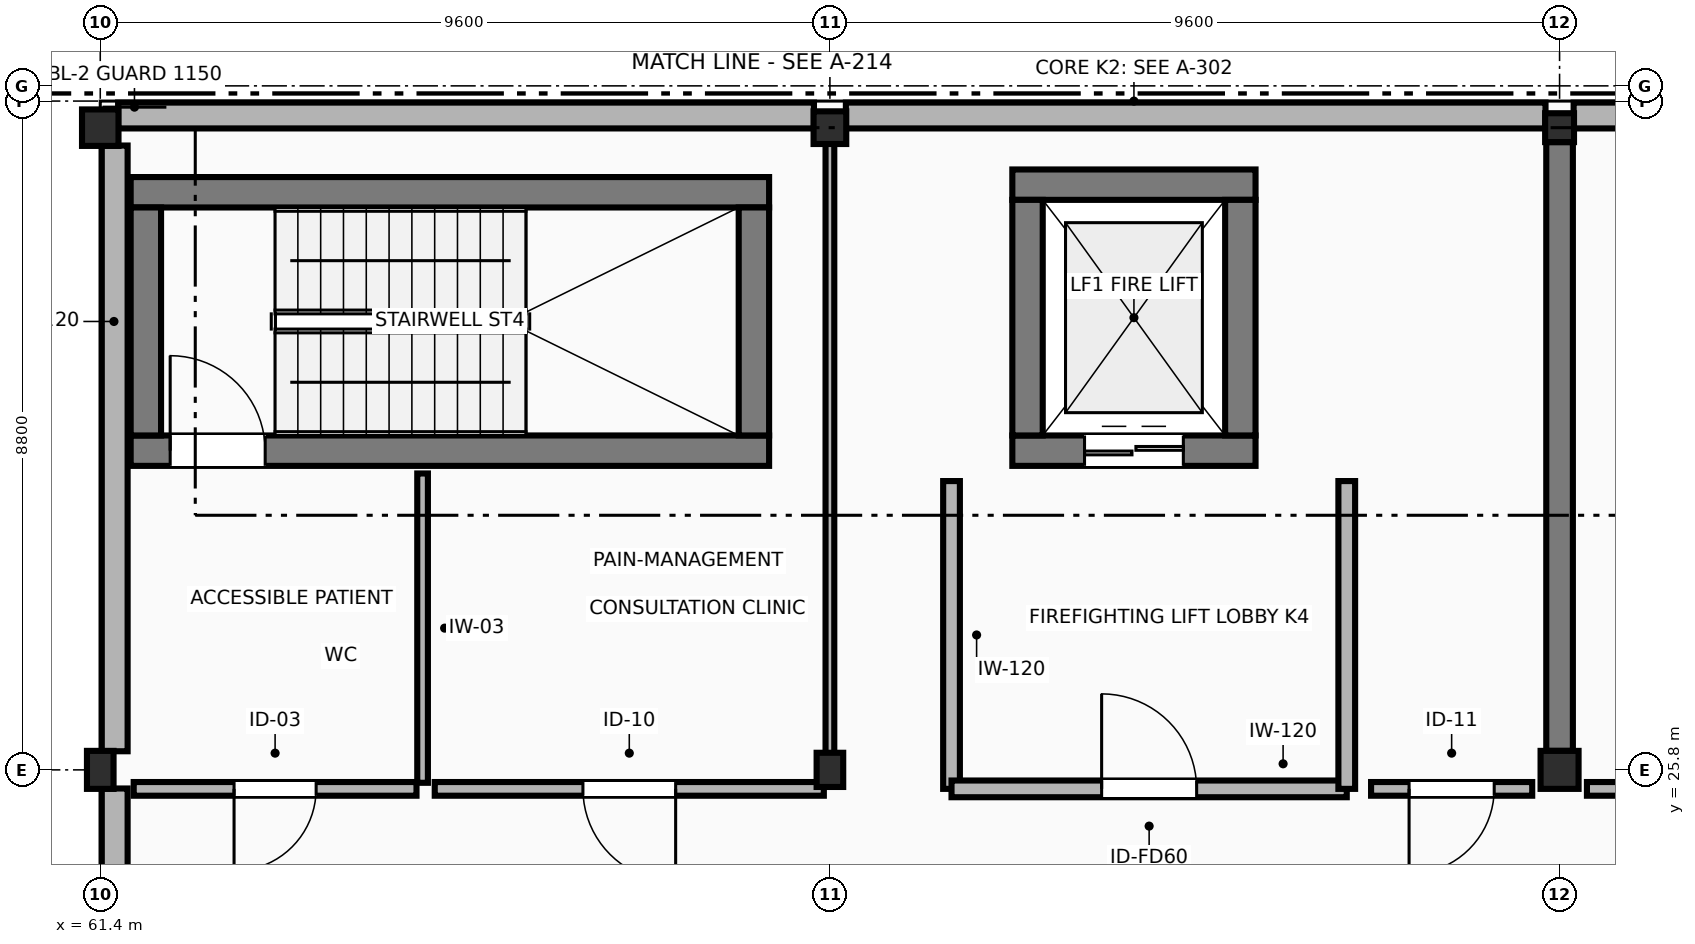
"""IFC4 building model, lengths in metres.
Left out: names, types, materials, properties, quantities, classifications, styles, units other than length and angle.
Written with IfcOpenShell. Run it as: python <this file> out.ifc"""

import sys

from ifc_helpers import new_model, si_unit, direction, frame, frame_2d, origin, origin_2d, place, context, subcontext, project, spatial, rectangle, extrude, element, fill, save


model = new_model("IFC4")
c1 = context("Model", 3, precision=1e-05, world=origin(), true_north=direction((0.0, 1.0)))
c2 = subcontext(c1, "Body", "Model", "MODEL_VIEW")
j1 = project(units=[si_unit("LENGTHUNIT", "METRE"), si_unit("PLANEANGLEUNIT", "RADIAN")], contexts=[c1])
p1 = place(None, origin())
s1 = spatial("IfcSite", under=j1, at=p1, CompositionType="ELEMENT")
p2 = place(p1, origin())
s2 = spatial("IfcBuilding", under=s1, at=p2, CompositionType="ELEMENT")
p3 = place(p2, frame((0.0, 0.0, 18.0)))
s3 = spatial("IfcBuildingStorey", under=s2, at=p3, CompositionType="ELEMENT", Elevation=18.0)
p4 = place(p3, frame((61.4, 25.8, 0.0), z_axis=(0.0, 0.0, 1.0), x_axis=(1.0, 0.0, 0.0)))
e1 = element("IfcColumn", 1, at=p4, inside=s3, PredefinedType="COLUMN", context=c2, shape_type="SweptSolid", body=[
    extrude(rectangle(XDim=0.35, YDim=0.5, at=origin_2d()), origin(), (0.0, 0.0, 1.0), 4.2),
])
p5 = place(p3, frame((61.4, 34.25, 0.0), z_axis=(0.0, 0.0, 1.0), x_axis=(1.0, 0.0, 0.0)))
e2 = element("IfcColumn", 2, at=p5, inside=s3, PredefinedType="COLUMN", context=c2, shape_type="SweptSolid", body=[
    extrude(rectangle(XDim=0.48, YDim=0.48, at=origin_2d()), origin(), (0.0, 0.0, 1.0), 4.2),
])
p6 = place(p3, frame((71.0, 25.8, 0.0), z_axis=(0.0, 0.0, 1.0), x_axis=(1.0, 0.0, 0.0)))
e3 = element("IfcColumn", 3, at=p6, inside=s3, PredefinedType="COLUMN", context=c2, shape_type="SweptSolid", body=[
    extrude(rectangle(XDim=0.35, YDim=0.45, at=origin_2d()), origin(), (0.0, 0.0, 1.0), 4.2),
])
p7 = place(p3, frame((71.0, 34.25, 0.0), z_axis=(0.0, 0.0, 1.0), x_axis=(1.0, 0.0, 0.0)))
e4 = element("IfcColumn", 4, at=p7, inside=s3, PredefinedType="COLUMN", context=c2, shape_type="SweptSolid", body=[
    extrude(rectangle(XDim=0.43, YDim=0.43, at=origin_2d()), origin(), (0.0, 0.0, 1.0), 4.2),
])
p8 = place(p3, frame((80.6, 25.8, 0.0), z_axis=(0.0, 0.0, 1.0), x_axis=(1.0, 0.0, 0.0)))
e5 = element("IfcColumn", 5, at=p8, inside=s3, PredefinedType="COLUMN", context=c2, shape_type="SweptSolid", body=[
    extrude(rectangle(XDim=0.5, YDim=0.5, at=origin_2d()), origin(), (0.0, 0.0, 1.0), 4.2),
])
p9 = place(p3, frame((80.6, 34.25, 0.0), z_axis=(0.0, 0.0, 1.0), x_axis=(1.0, 0.0, 0.0)))
e6 = element("IfcColumn", 6, at=p9, inside=s3, PredefinedType="COLUMN", context=c2, shape_type="SweptSolid", body=[
    extrude(rectangle(XDim=0.38, YDim=0.38, at=origin_2d()), origin(), (0.0, 0.0, 1.0), 4.2),
])
p10 = place(p3, frame((90.02, 34.41, 0.0), z_axis=(0.0, 0.0, 1.0), x_axis=(-1.0, 0.0, 0.0)))
e7 = element("IfcWall", 7, at=p10, inside=s3, PredefinedType="STANDARD", context=c2, shape_type="SweptSolid", body=[
    extrude(rectangle(XDim=9.235, YDim=0.34, at=frame_2d((4.618, 0.0))), origin(), (0.0, 0.0, 1.0), 3.205),
])
p11 = place(p3, frame((80.415, 34.41, 0.0), z_axis=(0.0, 0.0, 1.0), x_axis=(-1.0, 0.0, 0.0)))
e8 = element("IfcWall", 8, at=p11, inside=s3, PredefinedType="STANDARD", context=c2, shape_type="SweptSolid", body=[
    extrude(rectangle(XDim=9.205, YDim=0.34, at=frame_2d((4.603, 0.0))), origin(), (0.0, 0.0, 1.0), 3.205),
])
p12 = place(p3, frame((70.79, 34.41, 0.0), z_axis=(0.0, 0.0, 1.0), x_axis=(-1.0, 0.0, 0.0)))
e9 = element("IfcWall", 9, at=p12, inside=s3, PredefinedType="STANDARD", context=c2, shape_type="SweptSolid", body=[
    extrude(rectangle(XDim=9.155, YDim=0.34, at=frame_2d((4.578, 0.0))), origin(), (0.0, 0.0, 1.0), 3.205),
])
p13 = place(p3, frame((61.59, 34.015, 0.0), z_axis=(0.0, 0.0, 1.0), x_axis=(0.0, -1.0, 0.0)))
e10 = element("IfcWall", 10, at=p13, inside=s3, PredefinedType="STANDARD", context=c2, shape_type="SweptSolid", body=[
    extrude(rectangle(XDim=7.97, YDim=0.34, at=frame_2d((3.985, 0.0))), origin(), (0.0, 0.0, 1.0), 2.985),
])
p14 = place(p3, frame((61.59, 25.555, 0.0), z_axis=(0.0, 0.0, 1.0), x_axis=(0.0, -1.0, 0.0)))
e11 = element("IfcWall", 11, at=p14, inside=s3, PredefinedType="STANDARD", context=c2, shape_type="SweptSolid", body=[
    extrude(rectangle(XDim=8.195, YDim=0.34, at=frame_2d((4.097, 0.0))), origin(), (0.0, 0.0, 1.0), 2.985),
])
p15 = place(p3, frame((61.8, 30.0, 0.0), z_axis=(0.0, 0.0, 1.0), x_axis=(1.0, 0.0, 0.0)))
e12 = element("IfcWall", 12, at=p15, inside=s3, PredefinedType="SHEAR", context=c2, shape_type="SweptSolid", body=[
    extrude(rectangle(XDim=8.4, YDim=0.4, at=frame_2d((4.2, 0.0))), origin(), (0.0, 0.0, 1.0), 3.94),
])
p16 = place(p15, frame((0.52, 0.0, 0.0)))
e13 = element("IfcOpeningElement", 13, at=p16, cuts=e12, PredefinedType="OPENING", context=c2, shape_type="SweptSolid", body=[
    extrude(rectangle(XDim=1.25, YDim=2.2, at=frame_2d((0.625, 1.1))), frame((0.0, 0.21, 0.0), z_axis=(0.0, -1.0, 0.0), x_axis=(1.0, 0.0, 0.0)), (0.0, 0.0, 1.0), 0.42),
])
p17 = place(p3, frame((70.2, 33.4, 0.0), z_axis=(0.0, 0.0, 1.0), x_axis=(-1.0, 0.0, 0.0)))
e14 = element("IfcWall", 14, at=p17, inside=s3, PredefinedType="SHEAR", context=c2, shape_type="SweptSolid", body=[
    extrude(rectangle(XDim=8.4, YDim=0.4, at=frame_2d((4.2, 0.0))), origin(), (0.0, 0.0, 1.0), 3.94),
])
for number, where, z_axis, x_axis in (
    (15, (62.0, 30.2, 0.0), (0.0, 0.0, 1.0), (0.0, 1.0, 0.0)),
    (16, (70.0, 33.2, 0.0), (0.0, 0.0, 1.0), (0.0, -1.0, 0.0)),
):
    element("IfcWall", number, at=place(p3, frame(where, z_axis=z_axis, x_axis=x_axis)), inside=s3, PredefinedType="SHEAR", context=c2, shape_type="SweptSolid", body=[
        extrude(rectangle(XDim=3.0, YDim=0.4, at=frame_2d((1.5, 0.0))), origin(), (0.0, 0.0, 1.0), 3.94),
    ])
p18 = place(p3, frame((73.4, 30.0, 0.0), z_axis=(0.0, 0.0, 1.0), x_axis=(1.0, 0.0, 0.0)))
e17 = element("IfcWall", 17, at=p18, inside=s3, PredefinedType="SHEAR", context=c2, shape_type="SweptSolid", body=[
    extrude(rectangle(XDim=3.2, YDim=0.4, at=frame_2d((1.6, 0.0))), origin(), (0.0, 0.0, 1.0), 4.2),
])
p19 = place(p18, frame((0.95, 0.0, 0.0)))
e18 = element("IfcOpeningElement", 18, at=p19, cuts=e17, PredefinedType="OPENING", context=c2, shape_type="SweptSolid", body=[
    extrude(rectangle(XDim=1.3, YDim=2.25, at=frame_2d((0.65, 1.125))), frame((0.0, 0.21, 0.0), z_axis=(0.0, -1.0, 0.0), x_axis=(1.0, 0.0, 0.0)), (0.0, 0.0, 1.0), 0.42),
])
p20 = place(p3, frame((76.6, 33.5, 0.0), z_axis=(0.0, 0.0, 1.0), x_axis=(-1.0, 0.0, 0.0)))
e19 = element("IfcWall", 19, at=p20, inside=s3, PredefinedType="SHEAR", context=c2, shape_type="SweptSolid", body=[
    extrude(rectangle(XDim=3.2, YDim=0.4, at=frame_2d((1.6, 0.0))), origin(), (0.0, 0.0, 1.0), 4.2),
])
for number, where, z_axis, x_axis in (
    (20, (73.6, 30.2, 0.0), (0.0, 0.0, 1.0), (0.0, 1.0, 0.0)),
    (21, (76.4, 33.3, 0.0), (0.0, 0.0, 1.0), (0.0, -1.0, 0.0)),
):
    element("IfcWall", number, at=place(p3, frame(where, z_axis=z_axis, x_axis=x_axis)), inside=s3, PredefinedType="SHEAR", context=c2, shape_type="SweptSolid", body=[
        extrude(rectangle(XDim=3.1, YDim=0.4, at=frame_2d((1.55, 0.0))), origin(), (0.0, 0.0, 1.0), 4.2),
    ])
p21 = place(p3, frame((72.6, 29.6, 0.0), z_axis=(0.0, 0.0, 1.0), x_axis=(0.0, -1.0, 0.0)))
e22 = element("IfcWall", 22, at=p21, inside=s3, PredefinedType="PARTITIONING", context=c2, shape_type="SweptSolid", body=[
    extrude(rectangle(XDim=4.05, YDim=0.22, at=frame_2d((2.025, 0.0))), origin(), (0.0, 0.0, 1.0), 3.94),
])
p22 = place(p3, frame((72.6, 25.55, 0.0), z_axis=(0.0, 0.0, 1.0), x_axis=(1.0, 0.0, 0.0)))
e23 = element("IfcWall", 23, at=p22, inside=s3, PredefinedType="PARTITIONING", context=c2, shape_type="SweptSolid", body=[
    extrude(rectangle(XDim=5.2, YDim=0.22, at=frame_2d((2.6, 0.0))), origin(), (0.0, 0.0, 1.0), 3.245),
])
p23 = place(p22, frame((1.975, 0.0, 0.0)))
e24 = element("IfcOpeningElement", 24, at=p23, cuts=e23, PredefinedType="OPENING", context=c2, shape_type="SweptSolid", body=[
    extrude(rectangle(XDim=1.25, YDim=2.2, at=frame_2d((0.625, 1.1))), frame((0.0, 0.12, 0.0), z_axis=(0.0, -1.0, 0.0), x_axis=(1.0, 0.0, 0.0)), (0.0, 0.0, 1.0), 0.24),
])
p24 = place(p3, frame((77.8, 25.55, 0.0), z_axis=(0.0, 0.0, 1.0), x_axis=(0.0, 1.0, 0.0)))
e25 = element("IfcWall", 25, at=p24, inside=s3, PredefinedType="PARTITIONING", context=c2, shape_type="SweptSolid", body=[
    extrude(rectangle(XDim=4.05, YDim=0.22, at=frame_2d((2.025, 0.0))), origin(), (0.0, 0.0, 1.0), 3.663),
])
p25 = place(p3, frame((80.6, 26.05, 0.0), z_axis=(0.0, 0.0, 1.0), x_axis=(0.0, 1.0, 0.0)))
e26 = element("IfcWall", 26, at=p25, inside=s3, PredefinedType="SHEAR", context=c2, shape_type="SweptSolid", body=[
    extrude(rectangle(XDim=8.01, YDim=0.35, at=frame_2d((4.005, 0.0))), origin(), (0.0, 0.0, 1.0), 3.94),
])
p26 = place(p3, frame((65.641, 29.7, 0.0), z_axis=(0.0, 0.0, 1.0), x_axis=(0.0, -1.0, 0.0)))
e27 = element("IfcWall", 27, at=p26, inside=s3, PredefinedType="PARTITIONING", context=c2, shape_type="SweptSolid", body=[
    extrude(rectangle(XDim=4.07, YDim=0.14, at=frame_2d((2.035, 0.0))), origin(), (0.0, 0.0, 1.0), 3.94),
])
p27 = place(p3, frame((65.561, 25.55, 0.0), z_axis=(0.0, 0.0, 1.0), x_axis=(-1.0, 0.0, 0.0)))
e28 = element("IfcWall", 28, at=p27, inside=s3, PredefinedType="PARTITIONING", context=c2, shape_type="SweptSolid", body=[
    extrude(rectangle(XDim=3.721, YDim=0.18, at=frame_2d((1.86, 0.0))), origin(), (0.0, 0.0, 1.0), 3.245),
])
p28 = place(p27, frame((1.32, 0.0, 0.0)))
e29 = element("IfcOpeningElement", 29, at=p28, cuts=e28, PredefinedType="OPENING", context=c2, shape_type="SweptSolid", body=[
    extrude(rectangle(XDim=1.08, YDim=2.2, at=frame_2d((0.54, 1.1))), frame((0.0, 0.1, 0.0), z_axis=(0.0, -1.0, 0.0), x_axis=(1.0, 0.0, 0.0)), (0.0, 0.0, 1.0), 0.2),
])
p29 = place(p3, frame((71.0, 34.16, 0.0), z_axis=(0.0, 0.0, 1.0), x_axis=(0.0, -1.0, 0.0)))
e30 = element("IfcWall", 30, at=p29, inside=s3, PredefinedType="PARTITIONING", context=c2, shape_type="SweptSolid", body=[
    extrude(rectangle(XDim=8.53, YDim=0.115, at=frame_2d((4.265, 0.0))), origin(), (0.0, 0.0, 1.0), 3.425),
])
p30 = place(p3, frame((70.92, 25.55, 0.0), z_axis=(0.0, 0.0, 1.0), x_axis=(-1.0, 0.0, 0.0)))
e31 = element("IfcWall", 31, at=p30, inside=s3, PredefinedType="PARTITIONING", context=c2, shape_type="SweptSolid", body=[
    extrude(rectangle(XDim=5.119, YDim=0.18, at=frame_2d((2.56, 0.0))), origin(), (0.0, 0.0, 1.0), 3.245),
])
p31 = place(p30, frame((1.95, 0.0, 0.0)))
e32 = element("IfcOpeningElement", 32, at=p31, cuts=e31, PredefinedType="OPENING", context=c2, shape_type="SweptSolid", body=[
    extrude(rectangle(XDim=1.22, YDim=2.18, at=frame_2d((0.61, 1.09))), frame((0.0, 0.1, 0.0), z_axis=(0.0, -1.0, 0.0), x_axis=(1.0, 0.0, 0.0)), (0.0, 0.0, 1.0), 0.2),
])
p32 = place(p3, frame((80.24, 25.55, 0.0), z_axis=(0.0, 0.0, 1.0), x_axis=(-1.0, 0.0, 0.0)))
e33 = element("IfcWall", 33, at=p32, inside=s3, PredefinedType="PARTITIONING", context=c2, shape_type="SweptSolid", body=[
    extrude(rectangle(XDim=2.12, YDim=0.18, at=frame_2d((1.06, 0.0))), origin(), (0.0, 0.0, 1.0), 3.245),
])
p33 = place(p32, frame((0.5, 0.0, 0.0)))
e34 = element("IfcOpeningElement", 34, at=p33, cuts=e33, PredefinedType="OPENING", context=c2, shape_type="SweptSolid", body=[
    extrude(rectangle(XDim=1.12, YDim=2.16, at=frame_2d((0.56, 1.08))), frame((0.0, 0.1, 0.0), z_axis=(0.0, -1.0, 0.0), x_axis=(1.0, 0.0, 0.0)), (0.0, 0.0, 1.0), 0.2),
])
p34 = place(p3, frame((82.48, 25.55, 0.0), z_axis=(0.0, 0.0, 1.0), x_axis=(-1.0, 0.0, 0.0)))
e35 = element("IfcWall", 35, at=p34, inside=s3, PredefinedType="PARTITIONING", context=c2, shape_type="SweptSolid", body=[
    extrude(rectangle(XDim=1.52, YDim=0.18, at=frame_2d((0.76, 0.0))), origin(), (0.0, 0.0, 1.0), 3.245),
])
p35 = place(p16, origin())
e36 = element("IfcDoor", 36, at=p35, inside=s3, OperationType="SINGLE_SWING_LEFT", PredefinedType="DOOR", context=c2, shape_type="SweptSolid", body=[
    extrude(rectangle(XDim=1.25, YDim=2.2, at=frame_2d((0.625, 1.1))), frame((0.0, 0.025, 0.0), z_axis=(0.0, -1.0, 0.0), x_axis=(1.0, 0.0, 0.0)), (0.0, 0.0, 1.0), 0.05),
])
fill(e13, e36)
p36 = place(p19, origin())
e37 = element("IfcDoor", 37, at=p36, inside=s3, OperationType="DOUBLE_DOOR_SLIDING", PredefinedType="DOOR", context=c2, shape_type="SweptSolid", body=[
    extrude(rectangle(XDim=1.3, YDim=2.25, at=frame_2d((0.65, 1.125))), frame((0.0, 0.025, 0.0), z_axis=(0.0, -1.0, 0.0), x_axis=(1.0, 0.0, 0.0)), (0.0, 0.0, 1.0), 0.05),
])
fill(e18, e37)
p37 = place(p23, origin())
e38 = element("IfcDoor", 38, at=p37, inside=s3, OperationType="SINGLE_SWING_LEFT", PredefinedType="DOOR", context=c2, shape_type="SweptSolid", body=[
    extrude(rectangle(XDim=1.25, YDim=2.2, at=frame_2d((0.625, 1.1))), frame((0.0, 0.025, 0.0), z_axis=(0.0, -1.0, 0.0), x_axis=(1.0, 0.0, 0.0)), (0.0, 0.0, 1.0), 0.05),
])
fill(e24, e38)
p38 = place(p28, origin())
e39 = element("IfcDoor", 39, at=p38, inside=s3, OperationType="SINGLE_SWING_RIGHT", PredefinedType="DOOR", context=c2, shape_type="SweptSolid", body=[
    extrude(rectangle(XDim=1.08, YDim=2.2, at=frame_2d((0.54, 1.1))), frame((0.0, 0.025, 0.0), z_axis=(0.0, -1.0, 0.0), x_axis=(1.0, 0.0, 0.0)), (0.0, 0.0, 1.0), 0.05),
])
fill(e29, e39)
p39 = place(p31, origin())
e40 = element("IfcDoor", 40, at=p39, inside=s3, OperationType="SINGLE_SWING_LEFT", PredefinedType="DOOR", context=c2, shape_type="SweptSolid", body=[
    extrude(rectangle(XDim=1.22, YDim=2.18, at=frame_2d((0.61, 1.09))), frame((0.0, 0.025, 0.0), z_axis=(0.0, -1.0, 0.0), x_axis=(1.0, 0.0, 0.0)), (0.0, 0.0, 1.0), 0.05),
])
fill(e32, e40)
p40 = place(p33, origin())
e41 = element("IfcDoor", 41, at=p40, inside=s3, OperationType="SINGLE_SWING_RIGHT", PredefinedType="DOOR", context=c2, shape_type="SweptSolid", body=[
    extrude(rectangle(XDim=1.12, YDim=2.16, at=frame_2d((0.56, 1.08))), frame((0.0, 0.025, 0.0), z_axis=(0.0, -1.0, 0.0), x_axis=(1.0, 0.0, 0.0)), (0.0, 0.0, 1.0), 0.05),
])
fill(e34, e41)
save(model, sys.argv[1])
